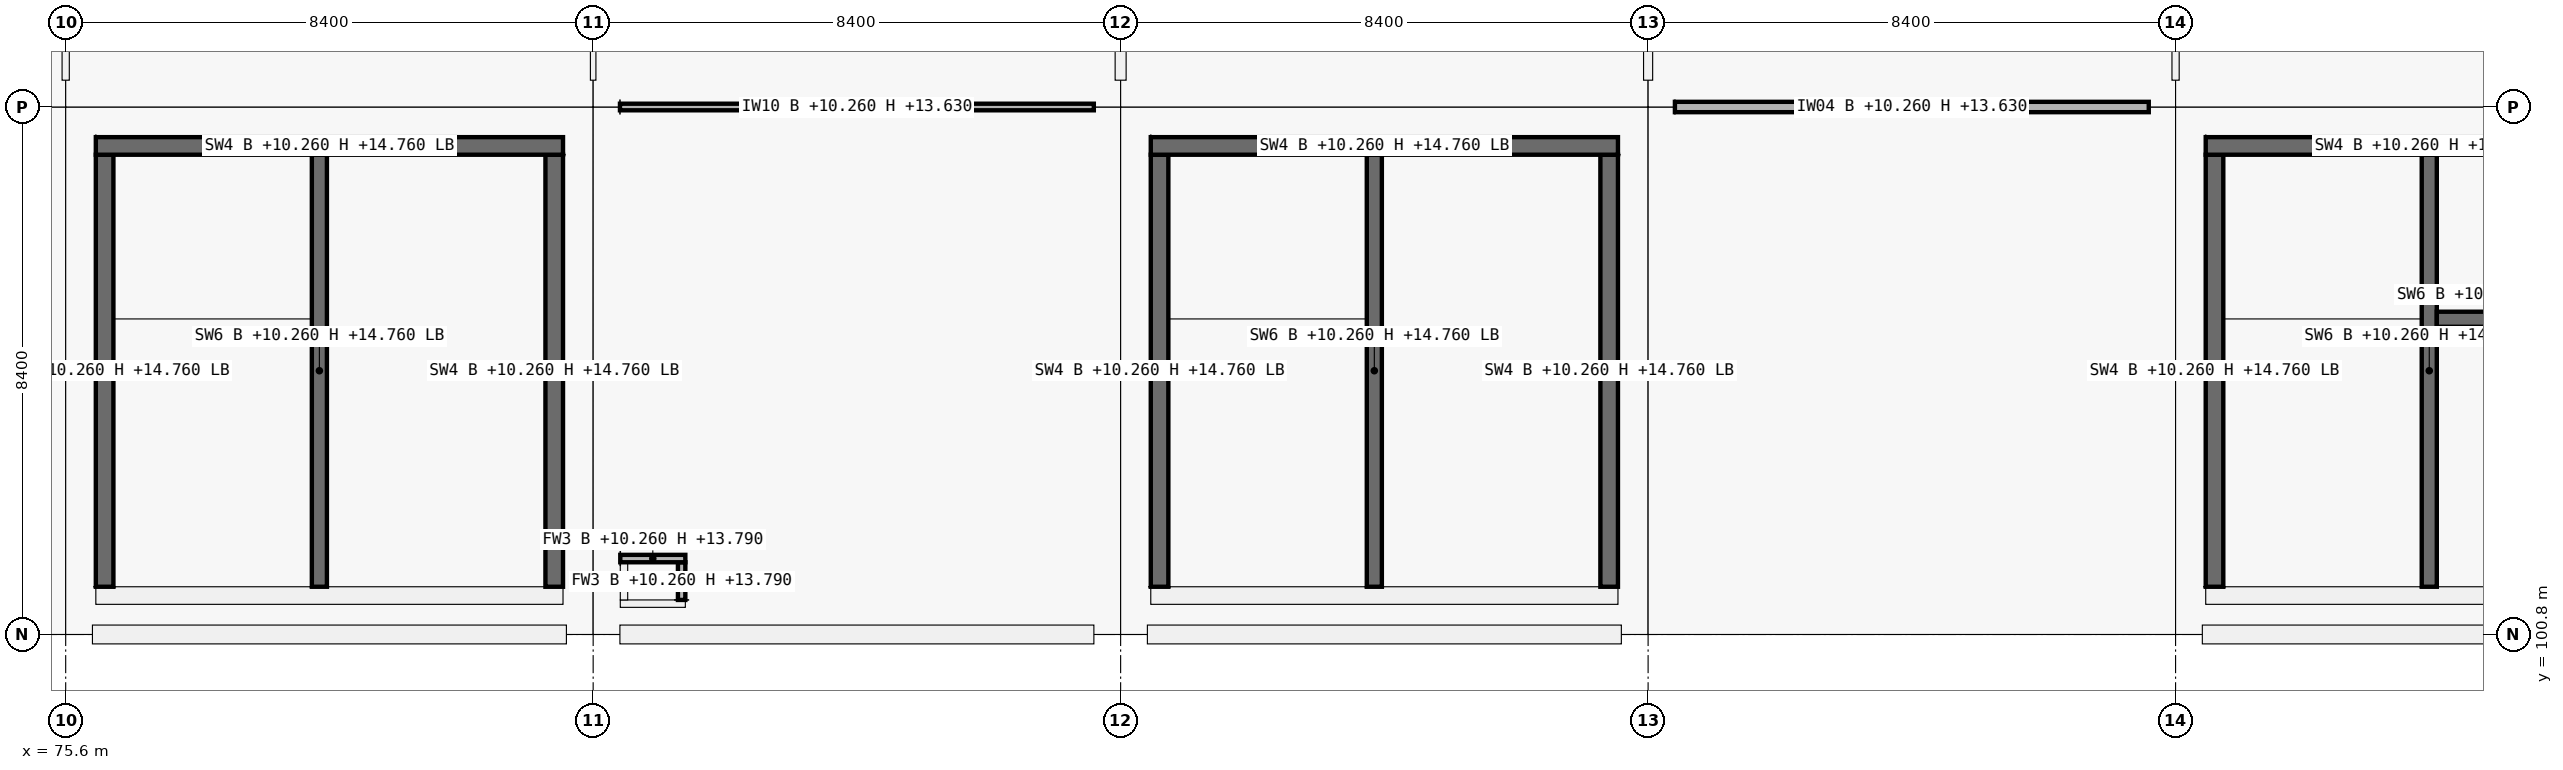
"""IFC4 building model, lengths in metres.
Left out: names, types, materials, properties, quantities, classifications, styles, units other than length and angle.
Written with IfcOpenShell. Run it as: python <this file> out.ifc"""

import sys

from ifc_helpers import new_model, si_unit, direction, frame, frame_2d, origin, origin_2d, place, context, subcontext, project, spatial, rectangle, extrude, element, fill, save


model = new_model("IFC4")
c1 = context("Model", 3, precision=1e-05, world=origin(), true_north=direction((0.0, 1.0)))
c2 = subcontext(c1, "Body", "Model", "MODEL_VIEW")
j1 = project(units=[si_unit("LENGTHUNIT", "METRE"), si_unit("PLANEANGLEUNIT", "RADIAN")], contexts=[c1])
p1 = place(None, origin())
s1 = spatial("IfcSite", under=j1, at=p1, CompositionType="ELEMENT")
p2 = place(p1, origin())
s2 = spatial("IfcBuilding", under=s1, at=p2, CompositionType="ELEMENT")
p3 = place(p2, frame((0.0, 0.0, 10.26)))
s3 = spatial("IfcBuildingStorey", under=s2, at=p3, CompositionType="ELEMENT", Elevation=10.26)
for number, where, z_axis, x_axis in (
    (1, (75.6, 100.8, 0.0), (0.0, 0.0, 1.0), (1.0, 0.0, 0.0)),
    (2, (75.6, 109.2, 0.0), (0.0, 0.0, 1.0), (1.0, 0.0, 0.0)),
    (3, (84.0, 100.8, 0.0), (0.0, 0.0, 1.0), (1.0, 0.0, 0.0)),
    (4, (84.0, 109.2, 0.0), (0.0, 0.0, 1.0), (1.0, 0.0, 0.0)),
    (5, (92.4, 100.8, 0.0), (0.0, 0.0, 1.0), (1.0, 0.0, 0.0)),
    (6, (92.4, 109.2, 0.0), (0.0, 0.0, 1.0), (1.0, 0.0, 0.0)),
    (7, (100.8, 100.8, 0.0), (0.0, 0.0, 1.0), (1.0, 0.0, 0.0)),
    (8, (100.8, 109.2, 0.0), (0.0, 0.0, 1.0), (1.0, 0.0, 0.0)),
    (9, (109.2, 100.8, 0.0), (0.0, 0.0, 1.0), (1.0, 0.0, 0.0)),
    (10, (109.2, 109.2, 0.0), (0.0, 0.0, 1.0), (1.0, 0.0, 0.0)),
):
    element("IfcColumn", number, at=place(p3, frame(where, z_axis=z_axis, x_axis=x_axis)), inside=s3, PredefinedType="COLUMN", context=c2, shape_type="SweptSolid", body=[
        extrude(rectangle(XDim=0.85, YDim=0.85, at=origin_2d()), origin(), (0.0, 0.0, 1.0), 4.5),
    ])
p4 = place(p3, frame((83.574, 100.8, 0.0), z_axis=(0.0, 0.0, 1.0), x_axis=(-1.0, 0.0, 0.0)))
e11 = element("IfcWall", 11, at=p4, inside=s3, PredefinedType="SOLIDWALL", context=c2, shape_type="SweptSolid", body=[
    extrude(rectangle(XDim=7.548, YDim=0.3, at=frame_2d((3.774, 0.0))), origin(), (0.0, 0.0, 1.0), 3.54),
])
p5 = place(p3, frame((91.974, 100.8, 0.0), z_axis=(0.0, 0.0, 1.0), x_axis=(-1.0, 0.0, 0.0)))
e12 = element("IfcWall", 12, at=p5, inside=s3, PredefinedType="SOLIDWALL", context=c2, shape_type="SweptSolid", body=[
    extrude(rectangle(XDim=7.548, YDim=0.3, at=frame_2d((3.774, 0.0))), origin(), (0.0, 0.0, 1.0), 3.54),
])
p6 = place(p5, frame((3.324, 0.0, 0.9)))
e13 = element("IfcOpeningElement", 13, at=p6, cuts=e12, PredefinedType="OPENING", context=c2, shape_type="SweptSolid", body=[
    extrude(rectangle(XDim=0.9, YDim=1.5, at=frame_2d((0.45, 0.75))), frame((0.0, 0.15, 0.0), z_axis=(0.0, -1.0, 0.0), x_axis=(1.0, 0.0, 0.0)), (0.0, 0.0, 1.0), 0.3),
])
for number, where, z_axis, x_axis in (
    (14, (100.374, 100.8, 0.0), (0.0, 0.0, 1.0), (-1.0, 0.0, 0.0)),
    (15, (117.174, 100.8, 0.0), (0.0, 0.0, 1.0), (-1.0, 0.0, 0.0)),
):
    element("IfcWall", number, at=place(p3, frame(where, z_axis=z_axis, x_axis=x_axis)), inside=s3, PredefinedType="SOLIDWALL", context=c2, shape_type="SweptSolid", body=[
        extrude(rectangle(XDim=7.548, YDim=0.3, at=frame_2d((3.774, 0.0))), origin(), (0.0, 0.0, 1.0), 3.54),
    ])
p7 = place(p3, frame((117.12, 101.42, 0.0), z_axis=(0.0, 0.0, 1.0), x_axis=(-1.0, 0.0, 0.0)))
e16 = element("IfcWall", 16, at=p7, inside=s3, PredefinedType="SHEAR", context=c2, shape_type="SweptSolid", body=[
    extrude(rectangle(XDim=7.44, YDim=0.28, at=frame_2d((3.72, 0.0))), origin(), (0.0, 0.0, 1.0), 4.5),
])
p8 = place(p3, frame((109.82, 101.56, 0.0), z_axis=(0.0, 0.0, 1.0), x_axis=(0.0, 1.0, 0.0)))
e17 = element("IfcWall", 17, at=p8, inside=s3, PredefinedType="SHEAR", context=c2, shape_type="SweptSolid", body=[
    extrude(rectangle(XDim=6.88, YDim=0.28, at=frame_2d((3.44, 0.0))), origin(), (0.0, 0.0, 1.0), 4.5),
])
p9 = place(p3, frame((109.68, 108.58, 0.0), z_axis=(0.0, 0.0, 1.0), x_axis=(1.0, 0.0, 0.0)))
e18 = element("IfcWall", 18, at=p9, inside=s3, PredefinedType="SHEAR", context=c2, shape_type="SweptSolid", body=[
    extrude(rectangle(XDim=7.44, YDim=0.28, at=frame_2d((3.72, 0.0))), origin(), (0.0, 0.0, 1.0), 4.5),
])
p10 = place(p3, frame((113.24, 101.56, 0.0), z_axis=(0.0, 0.0, 1.0), x_axis=(0.0, 1.0, 0.0)))
e19 = element("IfcWall", 19, at=p10, inside=s3, PredefinedType="SHEAR", context=c2, shape_type="SweptSolid", body=[
    extrude(rectangle(XDim=6.88, YDim=0.24, at=frame_2d((3.44, 0.0))), origin(), (0.0, 0.0, 1.0), 4.5),
])
p11 = place(p10, frame((0.12, 0.0, 0.0)))
e20 = element("IfcOpeningElement", 20, at=p11, cuts=e19, PredefinedType="OPENING", context=c2, shape_type="SweptSolid", body=[
    extrude(rectangle(XDim=1.0, YDim=2.15, at=frame_2d((0.5, 1.075))), frame((0.0, 0.12, 0.0), z_axis=(0.0, -1.0, 0.0), x_axis=(1.0, 0.0, 0.0)), (0.0, 0.0, 1.0), 0.24),
])
p12 = place(p3, frame((113.36, 105.82, 0.0), z_axis=(0.0, 0.0, 1.0), x_axis=(1.0, 0.0, 0.0)))
e21 = element("IfcWall", 21, at=p12, inside=s3, PredefinedType="SHEAR", context=c2, shape_type="SweptSolid", body=[
    extrude(rectangle(XDim=3.48, YDim=0.24, at=frame_2d((1.74, 0.0))), origin(), (0.0, 0.0, 1.0), 4.5),
])
p13 = place(p12, frame((1.14, 0.0, 0.0)))
e22 = element("IfcOpeningElement", 22, at=p13, cuts=e21, PredefinedType="OPENING", context=c2, shape_type="SweptSolid", body=[
    extrude(rectangle(XDim=1.2, YDim=2.2, at=frame_2d((0.6, 1.1))), frame((0.0, 0.12, 0.0), z_axis=(0.0, -1.0, 0.0), x_axis=(1.0, 0.0, 0.0)), (0.0, 0.0, 1.0), 0.24),
])
p14 = place(p3, frame((83.52, 101.42, 0.0), z_axis=(0.0, 0.0, 1.0), x_axis=(-1.0, 0.0, 0.0)))
e23 = element("IfcWall", 23, at=p14, inside=s3, PredefinedType="SHEAR", context=c2, shape_type="SweptSolid", body=[
    extrude(rectangle(XDim=7.44, YDim=0.28, at=frame_2d((3.72, 0.0))), origin(), (0.0, 0.0, 1.0), 4.5),
])
p15 = place(p3, frame((76.22, 101.56, 0.0), z_axis=(0.0, 0.0, 1.0), x_axis=(0.0, 1.0, 0.0)))
e24 = element("IfcWall", 24, at=p15, inside=s3, PredefinedType="SHEAR", context=c2, shape_type="SweptSolid", body=[
    extrude(rectangle(XDim=6.88, YDim=0.28, at=frame_2d((3.44, 0.0))), origin(), (0.0, 0.0, 1.0), 4.5),
])
p16 = place(p3, frame((76.08, 108.58, 0.0), z_axis=(0.0, 0.0, 1.0), x_axis=(1.0, 0.0, 0.0)))
e25 = element("IfcWall", 25, at=p16, inside=s3, PredefinedType="SHEAR", context=c2, shape_type="SweptSolid", body=[
    extrude(rectangle(XDim=7.44, YDim=0.28, at=frame_2d((3.72, 0.0))), origin(), (0.0, 0.0, 1.0), 4.5),
])
p17 = place(p3, frame((83.38, 108.44, 0.0), z_axis=(0.0, 0.0, 1.0), x_axis=(0.0, -1.0, 0.0)))
e26 = element("IfcWall", 26, at=p17, inside=s3, PredefinedType="SHEAR", context=c2, shape_type="SweptSolid", body=[
    extrude(rectangle(XDim=6.88, YDim=0.28, at=frame_2d((3.44, 0.0))), origin(), (0.0, 0.0, 1.0), 4.5),
])
p18 = place(p17, frame((3.99, 0.0, 0.0)))
e27 = element("IfcOpeningElement", 27, at=p18, cuts=e26, PredefinedType="OPENING", context=c2, shape_type="SweptSolid", body=[
    extrude(rectangle(XDim=1.5, YDim=2.15, at=frame_2d((0.75, 1.075))), frame((0.0, 0.14, 0.0), z_axis=(0.0, -1.0, 0.0), x_axis=(1.0, 0.0, 0.0)), (0.0, 0.0, 1.0), 0.28),
])
p19 = place(p3, frame((79.64, 101.56, 0.0), z_axis=(0.0, 0.0, 1.0), x_axis=(0.0, 1.0, 0.0)))
e28 = element("IfcWall", 28, at=p19, inside=s3, PredefinedType="SHEAR", context=c2, shape_type="SweptSolid", body=[
    extrude(rectangle(XDim=6.88, YDim=0.24, at=frame_2d((3.44, 0.0))), origin(), (0.0, 0.0, 1.0), 4.5),
])
p20 = place(p19, frame((0.12, 0.0, 0.0)))
e29 = element("IfcOpeningElement", 29, at=p20, cuts=e28, PredefinedType="OPENING", context=c2, shape_type="SweptSolid", body=[
    extrude(rectangle(XDim=1.0, YDim=2.15, at=frame_2d((0.5, 1.075))), frame((0.0, 0.12, 0.0), z_axis=(0.0, -1.0, 0.0), x_axis=(1.0, 0.0, 0.0)), (0.0, 0.0, 1.0), 0.24),
])
p21 = place(p3, frame((100.32, 101.42, 0.0), z_axis=(0.0, 0.0, 1.0), x_axis=(-1.0, 0.0, 0.0)))
e30 = element("IfcWall", 30, at=p21, inside=s3, PredefinedType="SHEAR", context=c2, shape_type="SweptSolid", body=[
    extrude(rectangle(XDim=7.44, YDim=0.28, at=frame_2d((3.72, 0.0))), origin(), (0.0, 0.0, 1.0), 4.5),
])
p22 = place(p3, frame((93.02, 101.56, 0.0), z_axis=(0.0, 0.0, 1.0), x_axis=(0.0, 1.0, 0.0)))
e31 = element("IfcWall", 31, at=p22, inside=s3, PredefinedType="SHEAR", context=c2, shape_type="SweptSolid", body=[
    extrude(rectangle(XDim=6.88, YDim=0.28, at=frame_2d((3.44, 0.0))), origin(), (0.0, 0.0, 1.0), 4.5),
])
p23 = place(p3, frame((92.88, 108.58, 0.0), z_axis=(0.0, 0.0, 1.0), x_axis=(1.0, 0.0, 0.0)))
e32 = element("IfcWall", 32, at=p23, inside=s3, PredefinedType="SHEAR", context=c2, shape_type="SweptSolid", body=[
    extrude(rectangle(XDim=7.44, YDim=0.28, at=frame_2d((3.72, 0.0))), origin(), (0.0, 0.0, 1.0), 4.5),
])
p24 = place(p3, frame((100.18, 108.44, 0.0), z_axis=(0.0, 0.0, 1.0), x_axis=(0.0, -1.0, 0.0)))
e33 = element("IfcWall", 33, at=p24, inside=s3, PredefinedType="SHEAR", context=c2, shape_type="SweptSolid", body=[
    extrude(rectangle(XDim=6.88, YDim=0.28, at=frame_2d((3.44, 0.0))), origin(), (0.0, 0.0, 1.0), 4.5),
])
p25 = place(p24, frame((3.99, 0.0, 0.0)))
e34 = element("IfcOpeningElement", 34, at=p25, cuts=e33, PredefinedType="OPENING", context=c2, shape_type="SweptSolid", body=[
    extrude(rectangle(XDim=1.5, YDim=2.15, at=frame_2d((0.75, 1.075))), frame((0.0, 0.14, 0.0), z_axis=(0.0, -1.0, 0.0), x_axis=(1.0, 0.0, 0.0)), (0.0, 0.0, 1.0), 0.28),
])
p26 = place(p3, frame((96.44, 101.56, 0.0), z_axis=(0.0, 0.0, 1.0), x_axis=(0.0, 1.0, 0.0)))
e35 = element("IfcWall", 35, at=p26, inside=s3, PredefinedType="SHEAR", context=c2, shape_type="SweptSolid", body=[
    extrude(rectangle(XDim=6.88, YDim=0.24, at=frame_2d((3.44, 0.0))), origin(), (0.0, 0.0, 1.0), 4.5),
])
p27 = place(p26, frame((0.12, 0.0, 0.0)))
e36 = element("IfcOpeningElement", 36, at=p27, cuts=e35, PredefinedType="OPENING", context=c2, shape_type="SweptSolid", body=[
    extrude(rectangle(XDim=1.0, YDim=2.15, at=frame_2d((0.5, 1.075))), frame((0.0, 0.12, 0.0), z_axis=(0.0, -1.0, 0.0), x_axis=(1.0, 0.0, 0.0)), (0.0, 0.0, 1.0), 0.24),
])
for number, where, z_axis, x_axis in (
    (37, (84.432, 101.291, 0.0), (0.0, 0.0, 1.0), (1.0, 0.0, 0.0)),
    (38, (84.432, 102.009, 0.0), (0.0, 0.0, 1.0), (1.0, 0.0, 0.0)),
):
    element("IfcWall", number, at=place(p3, frame(where, z_axis=z_axis, x_axis=x_axis)), inside=s3, PredefinedType="PARTITIONING", context=c2, shape_type="SweptSolid", body=[
        extrude(rectangle(XDim=1.036, YDim=0.118, at=frame_2d((0.518, 0.0))), origin(), (0.0, 0.0, 1.0), 3.53),
    ])
for number, where, z_axis, x_axis in (
    (39, (84.491, 101.35, 0.0), (0.0, 0.0, 1.0), (0.0, 1.0, 0.0)),
    (40, (85.409, 101.35, 0.0), (0.0, 0.0, 1.0), (0.0, 1.0, 0.0)),
):
    element("IfcWall", number, at=place(p3, frame(where, z_axis=z_axis, x_axis=x_axis)), inside=s3, PredefinedType="PARTITIONING", context=c2, shape_type="SweptSolid", body=[
        extrude(rectangle(XDim=0.6, YDim=0.118, at=frame_2d((0.3, 0.0))), origin(), (0.0, 0.0, 1.0), 3.53),
    ])
p28 = place(p3, frame((84.427, 109.2, 0.0), z_axis=(0.0, 0.0, 1.0), x_axis=(1.0, 0.0, 0.0)))
e41 = element("IfcWall", 41, at=p28, inside=s3, PredefinedType="PARTITIONING", context=c2, shape_type="SweptSolid", body=[
    extrude(rectangle(XDim=7.546, YDim=0.105, at=frame_2d((3.773, 0.0))), origin(), (0.0, 0.0, 1.0), 3.37),
])
p29 = place(p28, frame((3.288, 0.0, 0.0)))
e42 = element("IfcOpeningElement", 42, at=p29, cuts=e41, PredefinedType="OPENING", context=c2, shape_type="SweptSolid", body=[
    extrude(rectangle(XDim=0.97, YDim=2.12, at=frame_2d((0.485, 1.06))), frame((0.0, 0.052, 0.0), z_axis=(0.0, -1.0, 0.0), x_axis=(1.0, 0.0, 0.0)), (0.0, 0.0, 1.0), 0.105),
])
p30 = place(p3, frame((101.227, 109.2, 0.0), z_axis=(0.0, 0.0, 1.0), x_axis=(1.0, 0.0, 0.0)))
e43 = element("IfcWall", 43, at=p30, inside=s3, PredefinedType="PARTITIONING", context=c2, shape_type="SweptSolid", body=[
    extrude(rectangle(XDim=7.546, YDim=0.165, at=frame_2d((3.773, 0.0))), origin(), (0.0, 0.0, 1.0), 3.37),
])
p31 = place(p30, frame((3.273, 0.0, 0.0)))
e44 = element("IfcOpeningElement", 44, at=p31, cuts=e43, PredefinedType="OPENING", context=c2, shape_type="SweptSolid", body=[
    extrude(rectangle(XDim=1.0, YDim=2.2, at=frame_2d((0.5, 1.1))), frame((0.0, 0.083, 0.0), z_axis=(0.0, -1.0, 0.0), x_axis=(1.0, 0.0, 0.0)), (0.0, 0.0, 1.0), 0.165),
])
p32 = place(p3, frame((75.6, 109.627, 0.0), z_axis=(0.0, 0.0, 1.0), x_axis=(0.0, 1.0, 0.0)))
e45 = element("IfcWall", 45, at=p32, inside=s3, PredefinedType="PARTITIONING", context=c2, shape_type="SweptSolid", body=[
    extrude(rectangle(XDim=7.696, YDim=0.115, at=frame_2d((3.848, 0.0))), origin(), (0.0, 0.0, 1.0), 3.37),
])
p33 = place(p3, frame((84.0, 109.627, 0.0), z_axis=(0.0, 0.0, 1.0), x_axis=(0.0, 1.0, 0.0)))
e46 = element("IfcWall", 46, at=p33, inside=s3, PredefinedType="PARTITIONING", context=c2, shape_type="SweptSolid", body=[
    extrude(rectangle(XDim=7.696, YDim=0.088, at=frame_2d((3.848, 0.0))), origin(), (0.0, 0.0, 1.0), 3.37),
])
p34 = place(p33, frame((3.343, 0.0, 0.0)))
e47 = element("IfcOpeningElement", 47, at=p34, cuts=e46, PredefinedType="OPENING", context=c2, shape_type="SweptSolid", body=[
    extrude(rectangle(XDim=1.01, YDim=2.12, at=frame_2d((0.505, 1.06))), frame((0.0, 0.044, 0.0), z_axis=(0.0, -1.0, 0.0), x_axis=(1.0, 0.0, 0.0)), (0.0, 0.0, 1.0), 0.088),
])
p35 = place(p3, frame((92.4, 109.627, 0.0), z_axis=(0.0, 0.0, 1.0), x_axis=(0.0, 1.0, 0.0)))
e48 = element("IfcWall", 48, at=p35, inside=s3, PredefinedType="PARTITIONING", context=c2, shape_type="SweptSolid", body=[
    extrude(rectangle(XDim=7.696, YDim=0.175, at=frame_2d((3.848, 0.0))), origin(), (0.0, 0.0, 1.0), 3.37),
])
p36 = place(p35, frame((3.363, 0.0, 0.0)))
e49 = element("IfcOpeningElement", 49, at=p36, cuts=e48, PredefinedType="OPENING", context=c2, shape_type="SweptSolid", body=[
    extrude(rectangle(XDim=0.97, YDim=2.12, at=frame_2d((0.485, 1.06))), frame((0.0, 0.087, 0.0), z_axis=(0.0, -1.0, 0.0), x_axis=(1.0, 0.0, 0.0)), (0.0, 0.0, 1.0), 0.175),
])
p37 = place(p3, frame((100.8, 109.627, 0.0), z_axis=(0.0, 0.0, 1.0), x_axis=(0.0, 1.0, 0.0)))
e50 = element("IfcWall", 50, at=p37, inside=s3, PredefinedType="PARTITIONING", context=c2, shape_type="SweptSolid", body=[
    extrude(rectangle(XDim=7.696, YDim=0.145, at=frame_2d((3.848, 0.0))), origin(), (0.0, 0.0, 1.0), 3.37),
])
p38 = place(p37, frame((3.388, 0.0, 0.0)))
e51 = element("IfcOpeningElement", 51, at=p38, cuts=e50, PredefinedType="OPENING", context=c2, shape_type="SweptSolid", body=[
    extrude(rectangle(XDim=0.92, YDim=2.15, at=frame_2d((0.46, 1.075))), frame((0.0, 0.073, 0.0), z_axis=(0.0, -1.0, 0.0), x_axis=(1.0, 0.0, 0.0)), (0.0, 0.0, 1.0), 0.145),
])
p39 = place(p3, frame((109.2, 109.627, 0.0), z_axis=(0.0, 0.0, 1.0), x_axis=(0.0, 1.0, 0.0)))
e52 = element("IfcWall", 52, at=p39, inside=s3, PredefinedType="PARTITIONING", context=c2, shape_type="SweptSolid", body=[
    extrude(rectangle(XDim=7.696, YDim=0.115, at=frame_2d((3.848, 0.0))), origin(), (0.0, 0.0, 1.0), 3.37),
])
p40 = place(p39, frame((3.383, 0.0, 0.0)))
e53 = element("IfcOpeningElement", 53, at=p40, cuts=e52, PredefinedType="OPENING", context=c2, shape_type="SweptSolid", body=[
    extrude(rectangle(XDim=0.93, YDim=2.12, at=frame_2d((0.465, 1.06))), frame((0.0, 0.058, 0.0), z_axis=(0.0, -1.0, 0.0), x_axis=(1.0, 0.0, 0.0)), (0.0, 0.0, 1.0), 0.115),
])
p41 = place(p6, origin())
e54 = element("IfcWindow", 54, at=p41, inside=s3, PartitioningType="SINGLE_PANEL", PredefinedType="WINDOW", context=c2, shape_type="SweptSolid", body=[
    extrude(rectangle(XDim=0.9, YDim=1.5, at=frame_2d((0.45, 0.75))), frame((0.0, 0.03, 0.0), z_axis=(0.0, -1.0, 0.0), x_axis=(1.0, 0.0, 0.0)), (0.0, 0.0, 1.0), 0.06),
])
fill(e13, e54)
p42 = place(p11, origin())
e55 = element("IfcDoor", 55, at=p42, inside=s3, OperationType="SINGLE_SWING_LEFT", PredefinedType="DOOR", context=c2, shape_type="SweptSolid", body=[
    extrude(rectangle(XDim=1.0, YDim=2.15, at=frame_2d((0.5, 1.075))), frame((0.0, 0.025, 0.0), z_axis=(0.0, -1.0, 0.0), x_axis=(1.0, 0.0, 0.0)), (0.0, 0.0, 1.0), 0.05),
])
fill(e20, e55)
p43 = place(p20, origin())
e56 = element("IfcDoor", 56, at=p43, inside=s3, OperationType="SINGLE_SWING_RIGHT", PredefinedType="DOOR", context=c2, shape_type="SweptSolid", body=[
    extrude(rectangle(XDim=1.0, YDim=2.15, at=frame_2d((0.5, 1.075))), frame((0.0, 0.025, 0.0), z_axis=(0.0, -1.0, 0.0), x_axis=(1.0, 0.0, 0.0)), (0.0, 0.0, 1.0), 0.05),
])
fill(e29, e56)
p44 = place(p18, origin())
e57 = element("IfcDoor", 57, at=p44, inside=s3, OperationType="DOUBLE_DOOR_SINGLE_SWING", PredefinedType="DOOR", context=c2, shape_type="SweptSolid", body=[
    extrude(rectangle(XDim=1.5, YDim=2.15, at=frame_2d((0.75, 1.075))), frame((0.0, 0.025, 0.0), z_axis=(0.0, -1.0, 0.0), x_axis=(1.0, 0.0, 0.0)), (0.0, 0.0, 1.0), 0.05),
])
fill(e27, e57)
p45 = place(p27, origin())
e58 = element("IfcDoor", 58, at=p45, inside=s3, OperationType="SINGLE_SWING_LEFT", PredefinedType="DOOR", context=c2, shape_type="SweptSolid", body=[
    extrude(rectangle(XDim=1.0, YDim=2.15, at=frame_2d((0.5, 1.075))), frame((0.0, 0.025, 0.0), z_axis=(0.0, -1.0, 0.0), x_axis=(1.0, 0.0, 0.0)), (0.0, 0.0, 1.0), 0.05),
])
fill(e36, e58)
p46 = place(p25, origin())
e59 = element("IfcDoor", 59, at=p46, inside=s3, OperationType="DOUBLE_DOOR_SINGLE_SWING", PredefinedType="DOOR", context=c2, shape_type="SweptSolid", body=[
    extrude(rectangle(XDim=1.5, YDim=2.15, at=frame_2d((0.75, 1.075))), frame((0.0, 0.025, 0.0), z_axis=(0.0, -1.0, 0.0), x_axis=(1.0, 0.0, 0.0)), (0.0, 0.0, 1.0), 0.05),
])
fill(e34, e59)
p47 = place(p29, origin())
e60 = element("IfcDoor", 60, at=p47, inside=s3, OperationType="SINGLE_SWING_LEFT", PredefinedType="DOOR", context=c2, shape_type="SweptSolid", body=[
    extrude(rectangle(XDim=0.97, YDim=2.12, at=frame_2d((0.485, 1.06))), frame((0.0, 0.025, 0.0), z_axis=(0.0, -1.0, 0.0), x_axis=(1.0, 0.0, 0.0)), (0.0, 0.0, 1.0), 0.05),
])
fill(e42, e60)
p48 = place(p31, origin())
e61 = element("IfcDoor", 61, at=p48, inside=s3, OperationType="SINGLE_SWING_RIGHT", PredefinedType="DOOR", context=c2, shape_type="SweptSolid", body=[
    extrude(rectangle(XDim=1.0, YDim=2.2, at=frame_2d((0.5, 1.1))), frame((0.0, 0.025, 0.0), z_axis=(0.0, -1.0, 0.0), x_axis=(1.0, 0.0, 0.0)), (0.0, 0.0, 1.0), 0.05),
])
fill(e44, e61)
save(model, sys.argv[1])
